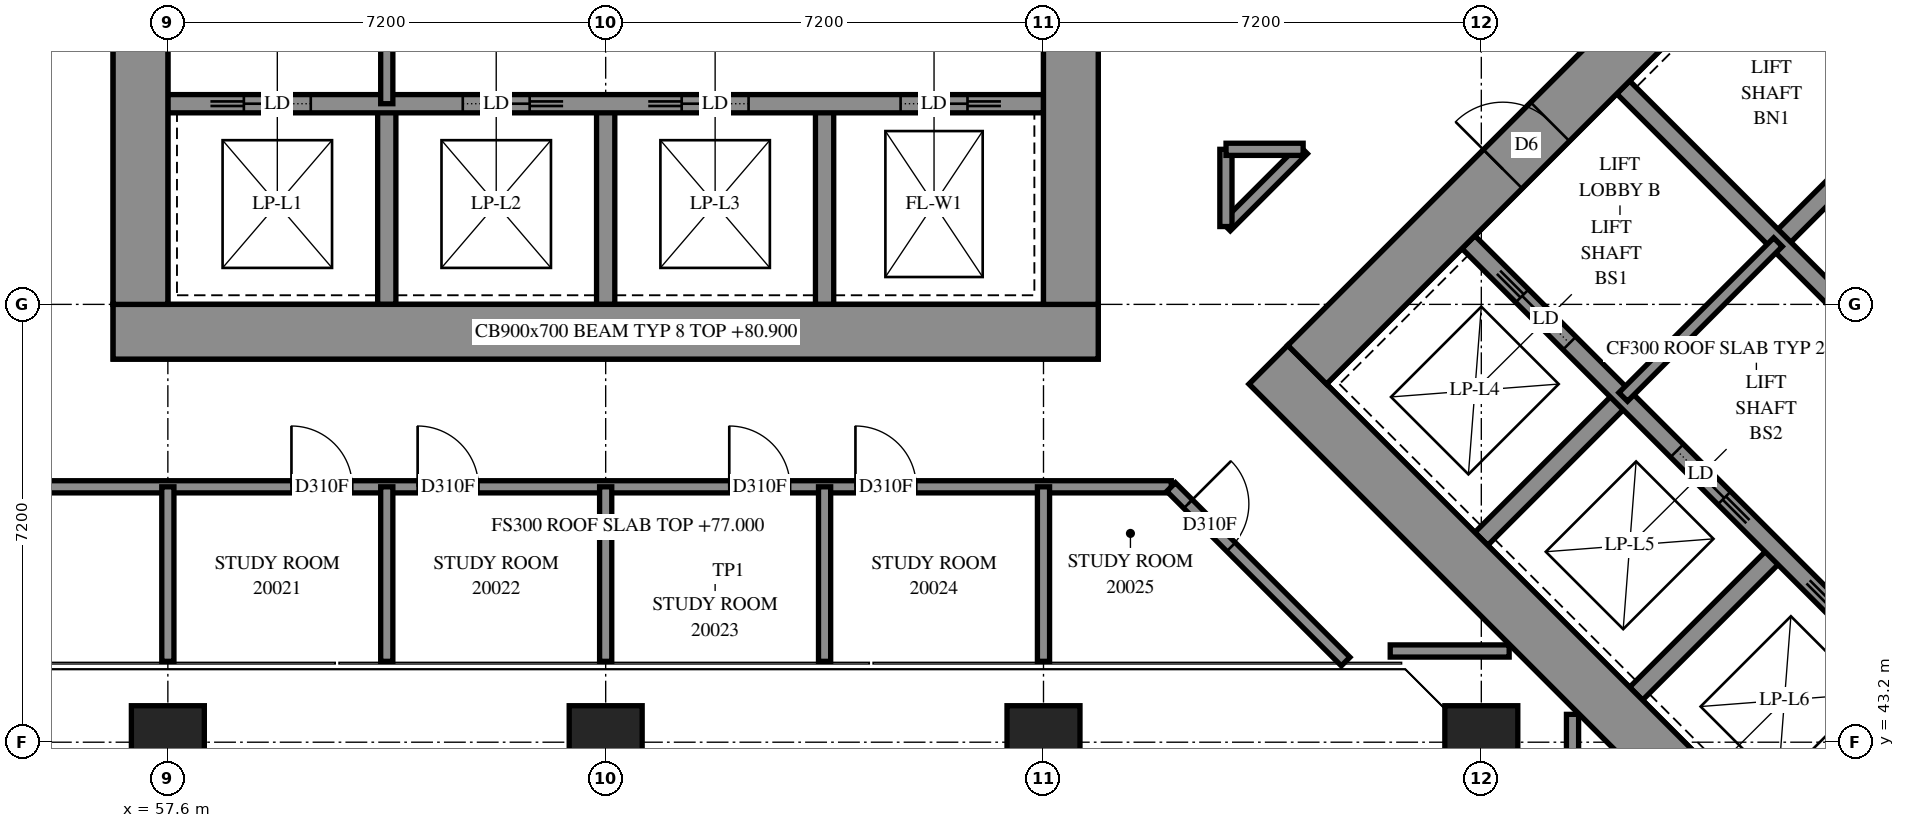
"""IFC4 building model, lengths in metres.
Left out: names, types, materials, properties, quantities, classifications, styles, units other than length and angle.
Written with IfcOpenShell. Run it as: python <this file> out.ifc"""

import sys

from ifc_helpers import new_model, si_unit, direction, frame, frame_2d, origin, origin_2d, place, context, subcontext, project, spatial, rectangle, extrude, element, fill, save


model = new_model("IFC4")
c1 = context("Model", 3, precision=1e-05, world=origin(), true_north=direction((0.0, 1.0)))
c2 = subcontext(c1, "Body", "Model", "MODEL_VIEW")
j1 = project(units=[si_unit("LENGTHUNIT", "METRE"), si_unit("PLANEANGLEUNIT", "RADIAN")], contexts=[c1])
p1 = place(None, origin())
s1 = spatial("IfcSite", under=j1, at=p1, CompositionType="ELEMENT")
p2 = place(p1, origin())
s2 = spatial("IfcBuilding", under=s1, at=p2, CompositionType="ELEMENT")
p3 = place(p2, frame((0.0, 0.0, 77.0)))
s3 = spatial("IfcBuildingStorey", under=s2, at=p3, CompositionType="ELEMENT", Elevation=77.0)
for number, where, z_axis, x_axis in (
    (1, (57.6, 43.2, 0.0), (0.0, 0.0, 1.0), (1.0, 0.0, 0.0)),
    (2, (64.8, 43.2, 0.0), (0.0, 0.0, 1.0), (1.0, 0.0, 0.0)),
    (3, (72.0, 43.2, 0.0), (0.0, 0.0, 1.0), (1.0, 0.0, 0.0)),
    (4, (79.2, 43.2, 0.0), (0.0, 0.0, 1.0), (1.0, 0.0, 0.0)),
):
    element("IfcColumn", number, at=place(p3, frame(where, z_axis=z_axis, x_axis=x_axis)), inside=s3, PredefinedType="COLUMN", context=c2, shape_type="SweptSolid", body=[
        extrude(rectangle(XDim=1.2, YDim=1.2, at=origin_2d()), origin(), (0.0, 0.0, 1.0), 3.9),
    ])
p4 = place(p3, frame((56.7, 49.95, -0.3), z_axis=(0.0, 0.0, 1.0), x_axis=(1.0, 0.0, 0.0)))
e5 = element("IfcWall", 5, at=p4, inside=s3, PredefinedType="SHEAR", context=c2, shape_type="SweptSolid", body=[
    extrude(rectangle(XDim=16.2, YDim=0.9, at=frame_2d((8.1, 0.0))), origin(), (0.0, 0.0, 1.0), 3.5),
])
p5 = place(p3, frame((57.15, 50.4, -0.3), z_axis=(0.0, 0.0, 1.0), x_axis=(0.0, 1.0, 0.0)))
e6 = element("IfcWall", 6, at=p5, inside=s3, PredefinedType="SHEAR", context=c2, shape_type="SweptSolid", body=[
    extrude(rectangle(XDim=14.4, YDim=0.9, at=frame_2d((7.2, 0.0))), origin(), (0.0, 0.0, 1.0), 3.5),
])
p6 = place(p5, frame((4.55, 0.0, 0.3)))
e7 = element("IfcOpeningElement", 7, at=p6, cuts=e6, PredefinedType="OPENING", context=c2, shape_type="SweptSolid", body=[
    extrude(rectangle(XDim=1.1, YDim=2.1, at=frame_2d((0.55, 1.05))), frame((0.0, 0.46, 0.0), z_axis=(0.0, -1.0, 0.0), x_axis=(1.0, 0.0, 0.0)), (0.0, 0.0, 1.0), 0.92),
])
p7 = place(p5, frame((11.35, 0.0, 0.3)))
e8 = element("IfcOpeningElement", 8, at=p7, cuts=e6, PredefinedType="OPENING", context=c2, shape_type="SweptSolid", body=[
    extrude(rectangle(XDim=1.1, YDim=2.1, at=frame_2d((0.55, 1.05))), frame((0.0, 0.46, 0.0), z_axis=(0.0, -1.0, 0.0), x_axis=(1.0, 0.0, 0.0)), (0.0, 0.0, 1.0), 0.92),
])
p8 = place(p3, frame((72.45, 50.4, -0.3), z_axis=(0.0, 0.0, 1.0), x_axis=(0.0, 1.0, 0.0)))
e9 = element("IfcWall", 9, at=p8, inside=s3, PredefinedType="SHEAR", context=c2, shape_type="SweptSolid", body=[
    extrude(rectangle(XDim=14.4, YDim=0.9, at=frame_2d((7.2, 0.0))), origin(), (0.0, 0.0, 1.0), 3.5),
])
p9 = place(p8, frame((4.55, 0.0, 0.3)))
e10 = element("IfcOpeningElement", 10, at=p9, cuts=e9, PredefinedType="OPENING", context=c2, shape_type="SweptSolid", body=[
    extrude(rectangle(XDim=1.1, YDim=2.1, at=frame_2d((0.55, 1.05))), frame((0.0, 0.46, 0.0), z_axis=(0.0, -1.0, 0.0), x_axis=(1.0, 0.0, 0.0)), (0.0, 0.0, 1.0), 0.92),
])
p10 = place(p8, frame((11.35, 0.0, 0.3)))
e11 = element("IfcOpeningElement", 11, at=p10, cuts=e9, PredefinedType="OPENING", context=c2, shape_type="SweptSolid", body=[
    extrude(rectangle(XDim=1.1, YDim=2.1, at=frame_2d((0.55, 1.05))), frame((0.0, 0.46, 0.0), z_axis=(0.0, -1.0, 0.0), x_axis=(1.0, 0.0, 0.0)), (0.0, 0.0, 1.0), 0.92),
])
for number, where, z_axis, x_axis in (
    (12, (61.2, 50.4, 0.0), (0.0, 0.0, 1.0), (0.0, 1.0, 0.0)),
    (13, (64.8, 50.4, 0.0), (0.0, 0.0, 1.0), (0.0, 1.0, 0.0)),
    (14, (68.4, 50.4, 0.0), (0.0, 0.0, 1.0), (0.0, 1.0, 0.0)),
):
    element("IfcWall", number, at=place(p3, frame(where, z_axis=z_axis, x_axis=x_axis)), inside=s3, PredefinedType="SOLIDWALL", context=c2, shape_type="SweptSolid", body=[
        extrude(rectangle(XDim=3.3, YDim=0.3, at=frame_2d((1.65, 0.0))), origin(), (0.0, 0.0, 1.0), 3.9),
    ])
p11 = place(p3, frame((57.6, 53.7, 0.0), z_axis=(0.0, 0.0, 1.0), x_axis=(1.0, 0.0, 0.0)))
e15 = element("IfcWall", 15, at=p11, inside=s3, PredefinedType="SOLIDWALL", context=c2, shape_type="SweptSolid", body=[
    extrude(rectangle(XDim=14.4, YDim=0.3, at=frame_2d((7.2, 0.0))), origin(), (0.0, 0.0, 1.0), 3.9),
])
p12 = place(p11, frame((1.25, 0.0, 0.0)))
e16 = element("IfcOpeningElement", 16, at=p12, cuts=e15, PredefinedType="OPENING", context=c2, shape_type="SweptSolid", body=[
    extrude(rectangle(XDim=1.1, YDim=2.1, at=frame_2d((0.55, 1.05))), frame((0.0, 0.16, 0.0), z_axis=(0.0, -1.0, 0.0), x_axis=(1.0, 0.0, 0.0)), (0.0, 0.0, 1.0), 0.32),
])
p13 = place(p11, frame((4.85, 0.0, 0.0)))
e17 = element("IfcOpeningElement", 17, at=p13, cuts=e15, PredefinedType="OPENING", context=c2, shape_type="SweptSolid", body=[
    extrude(rectangle(XDim=1.1, YDim=2.1, at=frame_2d((0.55, 1.05))), frame((0.0, 0.16, 0.0), z_axis=(0.0, -1.0, 0.0), x_axis=(1.0, 0.0, 0.0)), (0.0, 0.0, 1.0), 0.32),
])
p14 = place(p11, frame((8.45, 0.0, 0.0)))
e18 = element("IfcOpeningElement", 18, at=p14, cuts=e15, PredefinedType="OPENING", context=c2, shape_type="SweptSolid", body=[
    extrude(rectangle(XDim=1.1, YDim=2.1, at=frame_2d((0.55, 1.05))), frame((0.0, 0.16, 0.0), z_axis=(0.0, -1.0, 0.0), x_axis=(1.0, 0.0, 0.0)), (0.0, 0.0, 1.0), 0.32),
])
p15 = place(p11, frame((12.05, 0.0, 0.0)))
e19 = element("IfcOpeningElement", 19, at=p15, cuts=e15, PredefinedType="OPENING", context=c2, shape_type="SweptSolid", body=[
    extrude(rectangle(XDim=1.1, YDim=2.1, at=frame_2d((0.55, 1.05))), frame((0.0, 0.16, 0.0), z_axis=(0.0, -1.0, 0.0), x_axis=(1.0, 0.0, 0.0)), (0.0, 0.0, 1.0), 0.32),
])
p16 = place(p3, frame((75.7, 49.408, -0.3), z_axis=(0.0, 0.0, 1.0), x_axis=(0.7071098676, -0.7071036948, 0.0)))
e20 = element("IfcWall", 20, at=p16, inside=s3, PredefinedType="SHEAR", context=c2, shape_type="SweptSolid", body=[
    extrude(rectangle(XDim=16.2, YDim=0.9, at=frame_2d((8.1, 0.0))), origin(), (0.0, 0.0, 1.0), 3.5),
])
p17 = place(p3, frame((76.336, 49.408, -0.3), z_axis=(0.0, 0.0, 1.0), x_axis=(0.7071067812, 0.7071067812, 0.0)))
e21 = element("IfcWall", 21, at=p17, inside=s3, PredefinedType="SHEAR", context=c2, shape_type="SweptSolid", body=[
    extrude(rectangle(XDim=14.4, YDim=0.9, at=frame_2d((7.2, 0.0))), origin(), (0.0, 0.0, 1.0), 3.5),
])
p18 = place(p17, frame((4.55, 0.0, 0.3)))
e22 = element("IfcOpeningElement", 22, at=p18, cuts=e21, PredefinedType="OPENING", context=c2, shape_type="SweptSolid", body=[
    extrude(rectangle(XDim=1.1, YDim=2.1, at=frame_2d((0.55, 1.05))), frame((0.0, 0.46, 0.0), z_axis=(0.0, -1.0, 0.0), x_axis=(1.0, 0.0, 0.0)), (0.0, 0.0, 1.0), 0.92),
])
p19 = place(p17, frame((11.35, 0.0, 0.3)))
e23 = element("IfcOpeningElement", 23, at=p19, cuts=e21, PredefinedType="OPENING", context=c2, shape_type="SweptSolid", body=[
    extrude(rectangle(XDim=1.1, YDim=2.1, at=frame_2d((0.55, 1.05))), frame((0.0, 0.46, 0.0), z_axis=(0.0, -1.0, 0.0), x_axis=(1.0, 0.0, 0.0)), (0.0, 0.0, 1.0), 0.92),
])
for number, where, z_axis, x_axis in (
    (24, (79.2, 46.544, 0.0), (0.0, 0.0, 1.0), (0.707, 0.707, 0.0)),
    (25, (84.079, 51.423, 0.0), (0.0, 0.0, 1.0), (0.707, 0.707, 0.0)),
):
    element("IfcWall", number, at=place(p3, frame(where, z_axis=z_axis, x_axis=x_axis)), inside=s3, PredefinedType="SOLIDWALL", context=c2, shape_type="SweptSolid", body=[
        extrude(rectangle(XDim=3.3, YDim=0.3, at=frame_2d((1.65, 0.0))), origin(), (0.0, 0.0, 1.0), 3.9),
    ])
for number, where, z_axis, x_axis in (
    (26, (81.746, 43.999, 0.0), (0.0, 0.0, 1.0), (0.707, 0.707, 0.0)),
    (27, (84.291, 41.453, 0.0), (0.0, 0.0, 1.0), (0.707, 0.707, 0.0)),
):
    element("IfcWall", number, at=place(p3, frame(where, z_axis=z_axis, x_axis=x_axis)), inside=s3, PredefinedType="SOLIDWALL", context=c2, shape_type="SweptSolid", body=[
        extrude(rectangle(XDim=3.3, YDim=0.3, at=frame_2d((1.65, 0.0))), origin(), (0.0, 0.0, 1.0), 3.9),
    ])
p20 = place(p3, frame((78.988, 51.423, 0.0), z_axis=(0.0, 0.0, 1.0), x_axis=(0.7071067812, -0.7071067812, 0.0)))
e28 = element("IfcWall", 28, at=p20, inside=s3, PredefinedType="SOLIDWALL", context=c2, shape_type="SweptSolid", body=[
    extrude(rectangle(XDim=14.4, YDim=0.3, at=frame_2d((7.2, 0.0))), origin(), (0.0, 0.0, 1.0), 3.9),
])
p21 = place(p20, frame((1.25, 0.0, 0.0)))
e29 = element("IfcOpeningElement", 29, at=p21, cuts=e28, PredefinedType="OPENING", context=c2, shape_type="SweptSolid", body=[
    extrude(rectangle(XDim=1.1, YDim=2.1, at=frame_2d((0.55, 1.05))), frame((0.0, 0.16, 0.0), z_axis=(0.0, -1.0, 0.0), x_axis=(1.0, 0.0, 0.0)), (0.0, 0.0, 1.0), 0.32),
])
p22 = place(p20, frame((4.85, 0.0, 0.0)))
e30 = element("IfcOpeningElement", 30, at=p22, cuts=e28, PredefinedType="OPENING", context=c2, shape_type="SweptSolid", body=[
    extrude(rectangle(XDim=1.1, YDim=2.1, at=frame_2d((0.55, 1.05))), frame((0.0, 0.16, 0.0), z_axis=(0.0, -1.0, 0.0), x_axis=(1.0, 0.0, 0.0)), (0.0, 0.0, 1.0), 0.32),
])
p23 = place(p20, frame((8.45, 0.0, 0.0)))
e31 = element("IfcOpeningElement", 31, at=p23, cuts=e28, PredefinedType="OPENING", context=c2, shape_type="SweptSolid", body=[
    extrude(rectangle(XDim=1.1, YDim=2.1, at=frame_2d((0.55, 1.05))), frame((0.0, 0.16, 0.0), z_axis=(0.0, -1.0, 0.0), x_axis=(1.0, 0.0, 0.0)), (0.0, 0.0, 1.0), 0.32),
])
p24 = place(p20, frame((12.05, 0.0, 0.0)))
e32 = element("IfcOpeningElement", 32, at=p24, cuts=e28, PredefinedType="OPENING", context=c2, shape_type="SweptSolid", body=[
    extrude(rectangle(XDim=1.1, YDim=2.1, at=frame_2d((0.55, 1.05))), frame((0.0, 0.16, 0.0), z_axis=(0.0, -1.0, 0.0), x_axis=(1.0, 0.0, 0.0)), (0.0, 0.0, 1.0), 0.32),
])
p25 = place(p3, frame((81.534, 53.969, 0.0), z_axis=(0.0, 0.0, 1.0), x_axis=(0.707103309, -0.7071102534, 0.0)))
e33 = element("IfcWall", 33, at=p25, inside=s3, PredefinedType="SOLIDWALL", context=c2, shape_type="SweptSolid", body=[
    extrude(rectangle(XDim=14.4, YDim=0.3, at=frame_2d((7.2, 0.0))), origin(), (0.0, 0.0, 1.0), 3.9),
])
p26 = place(p25, frame((12.05, 0.0, 0.0)))
e34 = element("IfcOpeningElement", 34, at=p26, cuts=e33, PredefinedType="OPENING", context=c2, shape_type="SweptSolid", body=[
    extrude(rectangle(XDim=1.1, YDim=2.1, at=frame_2d((0.55, 1.05))), frame((0.0, 0.16, 0.0), z_axis=(0.0, -1.0, 0.0), x_axis=(1.0, 0.0, 0.0)), (0.0, 0.0, 1.0), 0.32),
])
p27 = place(p3, frame((83.867, 56.302, 0.0), z_axis=(0.0, 0.0, 1.0), x_axis=(0.7071137256, -0.7070998367, 0.0)))
e35 = element("IfcWall", 35, at=p27, inside=s3, PredefinedType="SOLIDWALL", context=c2, shape_type="SweptSolid", body=[
    extrude(rectangle(XDim=7.2, YDim=0.3, at=frame_2d((3.6, 0.0))), origin(), (0.0, 0.0, 1.0), 3.9),
])
for number, where, z_axis, x_axis in (
    (36, (61.2, 53.7, 0.0), (0.0, 0.0, 1.0), (0.0, 1.0, 0.0)),
    (37, (81.534, 48.878, 0.0), (0.0, 0.0, 1.0), (0.707, 0.707, 0.0)),
):
    element("IfcWall", number, at=place(p3, frame(where, z_axis=z_axis, x_axis=x_axis)), inside=s3, PredefinedType="PARTITIONING", context=c2, shape_type="SweptSolid", body=[
        extrude(rectangle(XDim=3.6, YDim=0.2, at=frame_2d((1.8, 0.0))), origin(), (0.0, 0.0, 1.0), 3.9),
    ])
p28 = place(p3, frame((54.6, 47.4, 0.0), z_axis=(0.0, 0.0, 1.0), x_axis=(1.0, 0.0, 0.0)))
e38 = element("IfcWall", 38, at=p28, inside=s3, PredefinedType="PARTITIONING", context=c2, shape_type="SweptSolid", body=[
    extrude(rectangle(XDim=19.502, YDim=0.2, at=frame_2d((9.751, 0.0))), origin(), (0.0, 0.0, 1.0), 3.9),
])
p29 = place(p28, frame((5.032, 0.0, 0.0)))
e39 = element("IfcOpeningElement", 39, at=p29, cuts=e38, PredefinedType="OPENING", context=c2, shape_type="SweptSolid", body=[
    extrude(rectangle(XDim=1.0, YDim=2.1, at=frame_2d((0.5, 1.05))), frame((0.0, 0.11, 0.0), z_axis=(0.0, -1.0, 0.0), x_axis=(1.0, 0.0, 0.0)), (0.0, 0.0, 1.0), 0.22),
])
p30 = place(p28, frame((7.107, 0.0, 0.0)))
e40 = element("IfcOpeningElement", 40, at=p30, cuts=e38, PredefinedType="OPENING", context=c2, shape_type="SweptSolid", body=[
    extrude(rectangle(XDim=1.0, YDim=2.1, at=frame_2d((0.5, 1.05))), frame((0.0, 0.11, 0.0), z_axis=(0.0, -1.0, 0.0), x_axis=(1.0, 0.0, 0.0)), (0.0, 0.0, 1.0), 0.22),
])
p31 = place(p28, frame((12.232, 0.0, 0.0)))
e41 = element("IfcOpeningElement", 41, at=p31, cuts=e38, PredefinedType="OPENING", context=c2, shape_type="SweptSolid", body=[
    extrude(rectangle(XDim=1.0, YDim=2.1, at=frame_2d((0.5, 1.05))), frame((0.0, 0.11, 0.0), z_axis=(0.0, -1.0, 0.0), x_axis=(1.0, 0.0, 0.0)), (0.0, 0.0, 1.0), 0.22),
])
p32 = place(p28, frame((14.307, 0.0, 0.0)))
e42 = element("IfcOpeningElement", 42, at=p32, cuts=e38, PredefinedType="OPENING", context=c2, shape_type="SweptSolid", body=[
    extrude(rectangle(XDim=1.0, YDim=2.1, at=frame_2d((0.5, 1.05))), frame((0.0, 0.11, 0.0), z_axis=(0.0, -1.0, 0.0), x_axis=(1.0, 0.0, 0.0)), (0.0, 0.0, 1.0), 0.22),
])
p33 = place(p3, frame((74.099, 47.397, 0.0), z_axis=(0.0, 0.0, 1.0), x_axis=(0.7071067812, -0.7071067812, 0.0)))
e43 = element("IfcWall", 43, at=p33, inside=s3, PredefinedType="PARTITIONING", context=c2, shape_type="SweptSolid", body=[
    extrude(rectangle(XDim=4.059, YDim=0.2, at=frame_2d((2.029, 0.0))), origin(), (0.0, 0.0, 1.0), 3.9),
])
p34 = place(p33, frame((0.395, 0.0, 0.0)))
e44 = element("IfcOpeningElement", 44, at=p34, cuts=e43, PredefinedType="OPENING", context=c2, shape_type="SweptSolid", body=[
    extrude(rectangle(XDim=1.0, YDim=2.1, at=frame_2d((0.5, 1.05))), frame((0.0, 0.11, 0.0), z_axis=(0.0, -1.0, 0.0), x_axis=(1.0, 0.0, 0.0)), (0.0, 0.0, 1.0), 0.22),
])
for number, where, z_axis, x_axis in (
    (45, (57.6, 44.53, 0.0), (0.0, 0.0, 1.0), (0.0, 1.0, 0.0)),
    (46, (61.2, 44.53, 0.0), (0.0, 0.0, 1.0), (0.0, 1.0, 0.0)),
    (47, (64.8, 44.53, 0.0), (0.0, 0.0, 1.0), (0.0, 1.0, 0.0)),
    (48, (68.4, 44.53, 0.0), (0.0, 0.0, 1.0), (0.0, 1.0, 0.0)),
    (49, (72.0, 44.53, 0.0), (0.0, 0.0, 1.0), (0.0, 1.0, 0.0)),
):
    element("IfcWall", number, at=place(p3, frame(where, z_axis=z_axis, x_axis=x_axis)), inside=s3, PredefinedType="PARTITIONING", context=c2, shape_type="SweptSolid", body=[
        extrude(rectangle(XDim=2.87, YDim=0.2, at=frame_2d((1.435, 0.0))), origin(), (0.0, 0.0, 1.0), 3.9),
    ])
p35 = place(p3, frame((77.702, 44.7, 0.0), z_axis=(0.0, 0.0, 1.0), x_axis=(1.0, 0.0, 0.0)))
e50 = element("IfcWall", 50, at=p35, inside=s3, PredefinedType="PARTITIONING", context=c2, shape_type="SweptSolid", body=[
    extrude(rectangle(XDim=1.956, YDim=0.2, at=frame_2d((0.978, 0.0))), origin(), (0.0, 0.0, 1.0), 3.9),
])
p36 = place(p3, frame((80.7, 41.834, 0.0), z_axis=(0.0, 0.0, 1.0), x_axis=(0.0, 1.0, 0.0)))
e51 = element("IfcWall", 51, at=p36, inside=s3, PredefinedType="PARTITIONING", context=c2, shape_type="SweptSolid", body=[
    extrude(rectangle(XDim=1.824, YDim=0.2, at=frame_2d((0.912, 0.0))), origin(), (0.0, 0.0, 1.0), 3.9),
])
p37 = place(p3, frame((75.001, 51.681, 0.0), z_axis=(0.0, 0.0, 1.0), x_axis=(0.7071067812, 0.7071067812, 0.0)))
e52 = element("IfcWall", 52, at=p37, inside=s3, PredefinedType="PARTITIONING", context=c2, shape_type="SweptSolid", body=[
    extrude(rectangle(XDim=1.793, YDim=0.2, at=frame_2d((0.897, 0.0))), origin(), (0.0, 0.0, 1.0), 3.9),
])
p38 = place(p3, frame((75.0, 51.68, 0.0), z_axis=(0.0, 0.0, 1.0), x_axis=(0.0, 1.0, 0.0)))
e53 = element("IfcWall", 53, at=p38, inside=s3, PredefinedType="PARTITIONING", context=c2, shape_type="SweptSolid", body=[
    extrude(rectangle(XDim=1.27, YDim=0.2, at=frame_2d((0.635, 0.0))), origin(), (0.0, 0.0, 1.0), 3.9),
])
p39 = place(p3, frame((75.002, 52.95, 0.0), z_axis=(0.0, 0.0, 1.0), x_axis=(1.0, 0.0, 0.0)))
e54 = element("IfcWall", 54, at=p39, inside=s3, PredefinedType="PARTITIONING", context=c2, shape_type="SweptSolid", body=[
    extrude(rectangle(XDim=1.268, YDim=0.2, at=frame_2d((0.634, 0.0))), origin(), (0.0, 0.0, 1.0), 3.9),
])
p40 = place(p12, origin())
e55 = element("IfcDoor", 55, at=p40, inside=s3, OperationType="SLIDING_TO_LEFT", PredefinedType="DOOR", context=c2, shape_type="SweptSolid", body=[
    extrude(rectangle(XDim=1.1, YDim=2.1, at=frame_2d((0.55, 1.05))), frame((0.0, 0.025, 0.0), z_axis=(0.0, -1.0, 0.0), x_axis=(1.0, 0.0, 0.0)), (0.0, 0.0, 1.0), 0.05),
])
fill(e16, e55)
p41 = place(p13, origin())
e56 = element("IfcDoor", 56, at=p41, inside=s3, OperationType="SLIDING_TO_RIGHT", PredefinedType="DOOR", context=c2, shape_type="SweptSolid", body=[
    extrude(rectangle(XDim=1.1, YDim=2.1, at=frame_2d((0.55, 1.05))), frame((0.0, 0.025, 0.0), z_axis=(0.0, -1.0, 0.0), x_axis=(1.0, 0.0, 0.0)), (0.0, 0.0, 1.0), 0.05),
])
fill(e17, e56)
p42 = place(p14, origin())
e57 = element("IfcDoor", 57, at=p42, inside=s3, OperationType="SLIDING_TO_LEFT", PredefinedType="DOOR", context=c2, shape_type="SweptSolid", body=[
    extrude(rectangle(XDim=1.1, YDim=2.1, at=frame_2d((0.55, 1.05))), frame((0.0, 0.025, 0.0), z_axis=(0.0, -1.0, 0.0), x_axis=(1.0, 0.0, 0.0)), (0.0, 0.0, 1.0), 0.05),
])
fill(e18, e57)
p43 = place(p15, origin())
e58 = element("IfcDoor", 58, at=p43, inside=s3, OperationType="SLIDING_TO_RIGHT", PredefinedType="DOOR", context=c2, shape_type="SweptSolid", body=[
    extrude(rectangle(XDim=1.1, YDim=2.1, at=frame_2d((0.55, 1.05))), frame((0.0, 0.025, 0.0), z_axis=(0.0, -1.0, 0.0), x_axis=(1.0, 0.0, 0.0)), (0.0, 0.0, 1.0), 0.05),
])
fill(e19, e58)
p44 = place(p18, origin())
e59 = element("IfcDoor", 59, at=p44, inside=s3, OperationType="DOUBLE_DOOR_SINGLE_SWING", PredefinedType="DOOR", context=c2, shape_type="SweptSolid", body=[
    extrude(rectangle(XDim=1.1, YDim=2.1, at=frame_2d((0.55, 1.05))), frame((0.0, 0.025, 0.0), z_axis=(0.0, -1.0, 0.0), x_axis=(1.0, 0.0, 0.0)), (0.0, 0.0, 1.0), 0.05),
])
fill(e22, e59)
p45 = place(p21, origin())
e60 = element("IfcDoor", 60, at=p45, inside=s3, OperationType="SLIDING_TO_LEFT", PredefinedType="DOOR", context=c2, shape_type="SweptSolid", body=[
    extrude(rectangle(XDim=1.1, YDim=2.1, at=frame_2d((0.55, 1.05))), frame((0.0, 0.025, 0.0), z_axis=(0.0, -1.0, 0.0), x_axis=(1.0, 0.0, 0.0)), (0.0, 0.0, 1.0), 0.05),
])
fill(e29, e60)
p46 = place(p22, origin())
e61 = element("IfcDoor", 61, at=p46, inside=s3, OperationType="SLIDING_TO_RIGHT", PredefinedType="DOOR", context=c2, shape_type="SweptSolid", body=[
    extrude(rectangle(XDim=1.1, YDim=2.1, at=frame_2d((0.55, 1.05))), frame((0.0, 0.025, 0.0), z_axis=(0.0, -1.0, 0.0), x_axis=(1.0, 0.0, 0.0)), (0.0, 0.0, 1.0), 0.05),
])
fill(e30, e61)
p47 = place(p29, origin())
e62 = element("IfcDoor", 62, at=p47, inside=s3, OperationType="SINGLE_SWING_LEFT", PredefinedType="DOOR", context=c2, shape_type="SweptSolid", body=[
    extrude(rectangle(XDim=1.0, YDim=2.1, at=frame_2d((0.5, 1.05))), frame((0.0, 0.025, 0.0), z_axis=(0.0, -1.0, 0.0), x_axis=(1.0, 0.0, 0.0)), (0.0, 0.0, 1.0), 0.05),
])
fill(e39, e62)
p48 = place(p30, origin())
e63 = element("IfcDoor", 63, at=p48, inside=s3, OperationType="SINGLE_SWING_RIGHT", PredefinedType="DOOR", context=c2, shape_type="SweptSolid", body=[
    extrude(rectangle(XDim=1.0, YDim=2.1, at=frame_2d((0.5, 1.05))), frame((0.0, 0.025, 0.0), z_axis=(0.0, -1.0, 0.0), x_axis=(1.0, 0.0, 0.0)), (0.0, 0.0, 1.0), 0.05),
])
fill(e40, e63)
p49 = place(p31, origin())
e64 = element("IfcDoor", 64, at=p49, inside=s3, OperationType="SINGLE_SWING_LEFT", PredefinedType="DOOR", context=c2, shape_type="SweptSolid", body=[
    extrude(rectangle(XDim=1.0, YDim=2.1, at=frame_2d((0.5, 1.05))), frame((0.0, 0.025, 0.0), z_axis=(0.0, -1.0, 0.0), x_axis=(1.0, 0.0, 0.0)), (0.0, 0.0, 1.0), 0.05),
])
fill(e41, e64)
p50 = place(p32, origin())
e65 = element("IfcDoor", 65, at=p50, inside=s3, OperationType="SINGLE_SWING_RIGHT", PredefinedType="DOOR", context=c2, shape_type="SweptSolid", body=[
    extrude(rectangle(XDim=1.0, YDim=2.1, at=frame_2d((0.5, 1.05))), frame((0.0, 0.025, 0.0), z_axis=(0.0, -1.0, 0.0), x_axis=(1.0, 0.0, 0.0)), (0.0, 0.0, 1.0), 0.05),
])
fill(e42, e65)
p51 = place(p34, origin())
e66 = element("IfcDoor", 66, at=p51, inside=s3, OperationType="SINGLE_SWING_LEFT", PredefinedType="DOOR", context=c2, shape_type="SweptSolid", body=[
    extrude(rectangle(XDim=1.0, YDim=2.1, at=frame_2d((0.5, 1.05))), frame((0.0, 0.025, 0.0), z_axis=(0.0, -1.0, 0.0), x_axis=(1.0, 0.0, 0.0)), (0.0, 0.0, 1.0), 0.05),
])
fill(e44, e66)
save(model, sys.argv[1])
